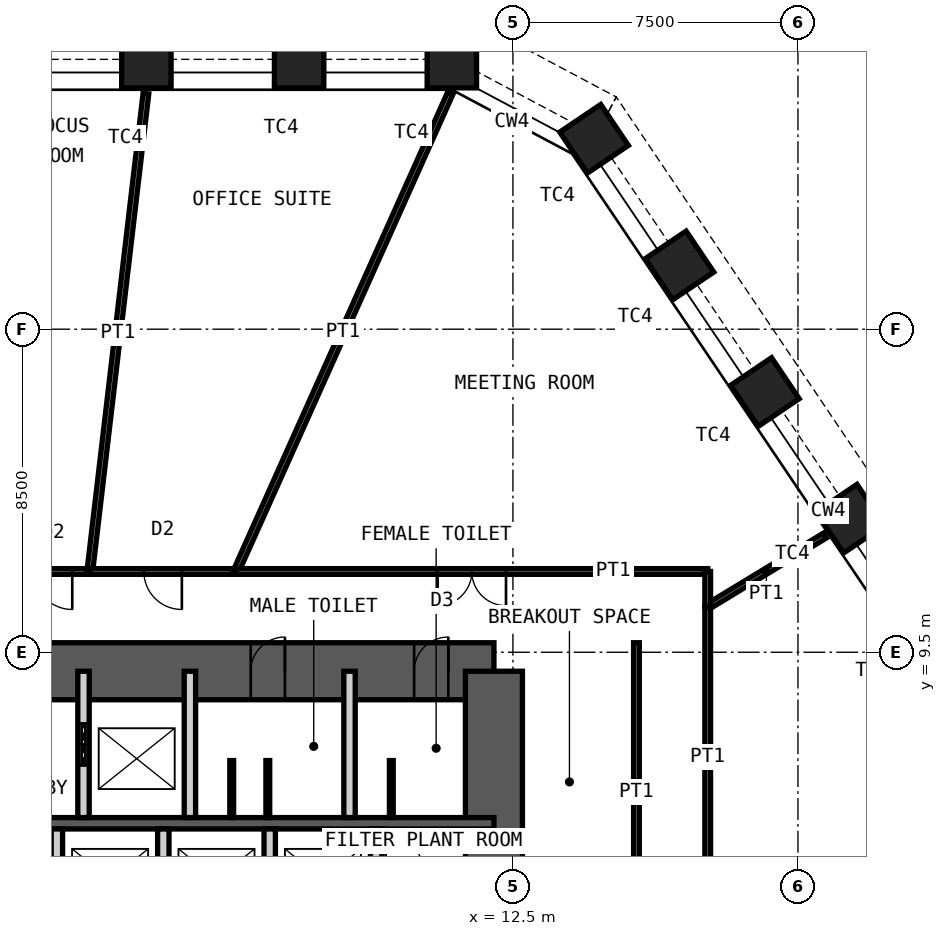
"""IFC4 building model, lengths in metres.
Left out: names, types, materials, properties, quantities, classifications, styles, units other than length and angle.
Written with IfcOpenShell. Run it as: python <this file> out.ifc"""

import sys

from ifc_helpers import new_model, si_unit, direction, frame, frame_2d, origin, origin_2d, place, context, subcontext, project, spatial, rectangle, hollow_rectangle, extrude, element, fill, save


model = new_model("IFC4")
c1 = context("Model", 3, precision=1e-05, world=origin(), true_north=direction((0.0, 1.0)))
c2 = subcontext(c1, "Body", "Model", "MODEL_VIEW")
j1 = project(units=[si_unit("LENGTHUNIT", "METRE"), si_unit("PLANEANGLEUNIT", "RADIAN")], contexts=[c1])
p1 = place(None, origin())
s1 = spatial("IfcSite", under=j1, at=p1, CompositionType="ELEMENT")
p2 = place(p1, origin())
s2 = spatial("IfcBuilding", under=s1, at=p2, CompositionType="ELEMENT")
p3 = place(p2, frame((0.0, 0.0, 140.8)))
s3 = spatial("IfcBuildingStorey", under=s2, at=p3, CompositionType="ELEMENT", Elevation=140.8)
for number, where, z_axis, x_axis in (
    (1, (2.854, 25.0, 0.0), (0.0, 0.0, 1.0), (-1.0, 0.0, 0.0)),
    (2, (6.874, 25.0, 0.0), (0.0, 0.0, 1.0), (-1.0, 0.0, 0.0)),
    (3, (10.893, 25.0, 0.0), (0.0, 0.0, 1.0), (-1.0, 0.0, 0.0)),
    (4, (14.635, 23.01, 0.0), (0.0, 0.0, 1.0), (-0.559, 0.829, 0.0)),
    (5, (16.882, 19.678, 0.0), (0.0, 0.0, 1.0), (-0.559, 0.829, 0.0)),
    (6, (19.13, 16.346, 0.0), (0.0, 0.0, 1.0), (-0.559, 0.829, 0.0)),
    (7, (21.377, 13.014, 0.0), (0.0, 0.0, 1.0), (-0.559, 0.829, 0.0)),
):
    element("IfcColumn", number, at=place(p3, frame(where, z_axis=z_axis, x_axis=x_axis)), inside=s3, PredefinedType="COLUMN", context=c2, shape_type="SweptSolid", body=[
        extrude(hollow_rectangle(XDim=1.3, YDim=1.3, WallThickness=0.1, at=origin_2d()), origin(), (0.0, 0.0, 1.0), 4.2),
    ])
p4 = place(p3, frame((-12.0, 9.0, 0.0), z_axis=(0.0, 0.0, 1.0), x_axis=(1.0, 0.0, 0.0)))
e8 = element("IfcWall", 8, at=p4, inside=s3, PredefinedType="SHEAR", context=c2, shape_type="SweptSolid", body=[
    extrude(rectangle(XDim=24.0, YDim=1.5, at=frame_2d((12.0, 0.0))), origin(), (0.0, 0.0, 1.0), 4.2),
])
p5 = place(p4, frame((10.4, 0.0, 0.0)))
e9 = element("IfcOpeningElement", 9, at=p5, cuts=e8, PredefinedType="OPENING", context=c2, shape_type="SweptSolid", body=[
    extrude(rectangle(XDim=1.0, YDim=2.1, at=frame_2d((0.5, 1.05))), frame((0.0, 0.76, 0.0), z_axis=(0.0, -1.0, 0.0), x_axis=(1.0, 0.0, 0.0)), (0.0, 0.0, 1.0), 1.52),
])
p6 = place(p4, frame((17.6, 0.0, 0.0)))
e10 = element("IfcOpeningElement", 10, at=p6, cuts=e8, PredefinedType="OPENING", context=c2, shape_type="SweptSolid", body=[
    extrude(rectangle(XDim=0.9, YDim=2.1, at=frame_2d((0.45, 1.05))), frame((0.0, 0.76, 0.0), z_axis=(0.0, -1.0, 0.0), x_axis=(1.0, 0.0, 0.0)), (0.0, 0.0, 1.0), 1.52),
])
p7 = place(p4, frame((21.9, 0.0, 0.0)))
e11 = element("IfcOpeningElement", 11, at=p7, cuts=e8, PredefinedType="OPENING", context=c2, shape_type="SweptSolid", body=[
    extrude(rectangle(XDim=0.9, YDim=2.1, at=frame_2d((0.45, 1.05))), frame((0.0, 0.76, 0.0), z_axis=(0.0, -1.0, 0.0), x_axis=(1.0, 0.0, 0.0)), (0.0, 0.0, 1.0), 1.52),
])
p8 = place(p3, frame((12.0, -9.0, 0.0), z_axis=(0.0, 0.0, 1.0), x_axis=(0.0, 1.0, 0.0)))
e12 = element("IfcWall", 12, at=p8, inside=s3, PredefinedType="SHEAR", context=c2, shape_type="SweptSolid", body=[
    extrude(rectangle(XDim=18.0, YDim=1.5, at=frame_2d((9.0, 0.0))), origin(), (0.0, 0.0, 1.0), 4.2),
])
p9 = place(p8, frame((8.1, 0.0, 0.0)))
e13 = element("IfcOpeningElement", 13, at=p9, cuts=e12, PredefinedType="OPENING", context=c2, shape_type="SweptSolid", body=[
    extrude(rectangle(XDim=1.8, YDim=2.1, at=frame_2d((0.9, 1.05))), frame((0.0, 0.76, 0.0), z_axis=(0.0, -1.0, 0.0), x_axis=(1.0, 0.0, 0.0)), (0.0, 0.0, 1.0), 1.52),
])
p10 = place(p3, frame((-12.0, 5.0, 0.0), z_axis=(0.0, 0.0, 1.0), x_axis=(1.0, 0.0, 0.0)))
e14 = element("IfcWall", 14, at=p10, inside=s3, PredefinedType="SHEAR", context=c2, shape_type="SweptSolid", body=[
    extrude(rectangle(XDim=24.0, YDim=0.3, at=frame_2d((12.0, 0.0))), origin(), (0.0, 0.0, 1.0), 4.2),
])
p11 = place(p3, frame((1.2, 5.15, 0.0), z_axis=(0.0, 0.0, 1.0), x_axis=(0.0, 1.0, 0.0)))
e15 = element("IfcWall", 15, at=p11, inside=s3, PredefinedType="PARTITIONING", context=c2, shape_type="SweptSolid", body=[
    extrude(rectangle(XDim=3.85, YDim=0.3, at=frame_2d((1.925, 0.0))), origin(), (0.0, 0.0, 1.0), 3.98),
])
p12 = place(p11, frame((1.375, 0.0, 0.0)))
e16 = element("IfcOpeningElement", 16, at=p12, cuts=e15, PredefinedType="OPENING", context=c2, shape_type="SweptSolid", body=[
    extrude(rectangle(XDim=1.1, YDim=2.4, at=frame_2d((0.55, 1.2))), frame((0.0, 0.16, 0.0), z_axis=(0.0, -1.0, 0.0), x_axis=(1.0, 0.0, 0.0)), (0.0, 0.0, 1.0), 0.32),
])
for number, where, z_axis, x_axis in (
    (17, (4.0, 5.15, 0.0), (0.0, 0.0, 1.0), (0.0, 1.0, 0.0)),
    (18, (8.2, 5.15, 0.0), (0.0, 0.0, 1.0), (0.0, 1.0, 0.0)),
):
    element("IfcWall", number, at=place(p3, frame(where, z_axis=z_axis, x_axis=x_axis)), inside=s3, PredefinedType="PARTITIONING", context=c2, shape_type="SweptSolid", body=[
        extrude(rectangle(XDim=3.85, YDim=0.3, at=frame_2d((1.925, 0.0))), origin(), (0.0, 0.0, 1.0), 3.98),
    ])
for number, where, z_axis, x_axis in (
    (19, (0.5, 2.2, 0.0), (0.0, 0.0, 1.0), (0.0, 1.0, 0.0)),
    (20, (3.3, 2.2, 0.0), (0.0, 0.0, 1.0), (0.0, 1.0, 0.0)),
    (21, (6.1, 2.2, 0.0), (0.0, 0.0, 1.0), (0.0, 1.0, 0.0)),
    (22, (8.9, 2.2, 0.0), (0.0, 0.0, 1.0), (0.0, 1.0, 0.0)),
):
    element("IfcWall", number, at=place(p3, frame(where, z_axis=z_axis, x_axis=x_axis)), inside=s3, PredefinedType="PARTITIONING", context=c2, shape_type="SweptSolid", body=[
        extrude(rectangle(XDim=2.65, YDim=0.3, at=frame_2d((1.325, 0.0))), origin(), (0.0, 0.0, 1.0), 3.98),
    ])
for number, where, z_axis, x_axis in (
    (23, (5.1, 5.15, 0.0), (0.0, 0.0, 1.0), (0.0, 1.0, 0.0)),
    (24, (6.05, 5.15, 0.0), (0.0, 0.0, 1.0), (0.0, 1.0, 0.0)),
    (25, (9.3, 5.15, 0.0), (0.0, 0.0, 1.0), (0.0, 1.0, 0.0)),
):
    element("IfcWall", number, at=place(p3, frame(where, z_axis=z_axis, x_axis=x_axis)), inside=s3, PredefinedType="PARTITIONING", context=c2, shape_type="SweptSolid", body=[
        extrude(rectangle(XDim=1.5, YDim=0.1, at=frame_2d((0.75, 0.0))), origin(), (0.0, 0.0, 1.0), 2.1),
    ])
p13 = place(p3, frame((20.711, 12.571, 0.0), z_axis=(0.0, 0.0, 1.0), x_axis=(-0.854862500505, -0.518854608952, 0.0)))
e26 = element("IfcWall", 26, at=p13, inside=s3, PredefinedType="PARTITIONING", context=c2, shape_type="SweptSolid", body=[
    extrude(rectangle(XDim=3.61, YDim=0.15, at=frame_2d((1.805, 0.0))), origin(), (0.0, 0.0, 1.0), 3.33),
])
p14 = place(p3, frame((17.625, 10.698, 0.0), z_axis=(0.0, 0.0, 1.0), x_axis=(0.0, -1.0, 0.0)))
e27 = element("IfcWall", 27, at=p14, inside=s3, PredefinedType="PARTITIONING", context=c2, shape_type="SweptSolid", body=[
    extrude(rectangle(XDim=19.778, YDim=0.15, at=frame_2d((9.889, 0.0))), origin(), (0.0, 0.0, 1.0), 4.03),
])
p15 = place(p14, frame((8.989, 0.0, 0.0)))
e28 = element("IfcOpeningElement", 28, at=p15, cuts=e27, PredefinedType="OPENING", context=c2, shape_type="SweptSolid", body=[
    extrude(rectangle(XDim=1.8, YDim=2.4, at=frame_2d((0.9, 1.2))), frame((0.0, 0.085, 0.0), z_axis=(0.0, -1.0, 0.0), x_axis=(1.0, 0.0, 0.0)), (0.0, 0.0, 1.0), 0.17),
])
p16 = place(p3, frame((-0.557, 11.625, 0.0), z_axis=(0.0, 0.0, 1.0), x_axis=(1.0, 0.0, 0.0)))
e29 = element("IfcWall", 29, at=p16, inside=s3, PredefinedType="PARTITIONING", context=c2, shape_type="SweptSolid", body=[
    extrude(rectangle(XDim=1.923, YDim=0.15, at=frame_2d((0.961, 0.0))), origin(), (0.0, 0.0, 1.0), 4.03),
])
p17 = place(p16, frame((0.461, 0.0, 0.0)))
e30 = element("IfcOpeningElement", 30, at=p17, cuts=e29, PredefinedType="OPENING", context=c2, shape_type="SweptSolid", body=[
    extrude(rectangle(XDim=1.0, YDim=2.4, at=frame_2d((0.5, 1.2))), frame((0.0, 0.085, 0.0), z_axis=(0.0, -1.0, 0.0), x_axis=(1.0, 0.0, 0.0)), (0.0, 0.0, 1.0), 0.17),
])
p18 = place(p3, frame((2.843, 24.201, 0.0), z_axis=(0.0, 0.0, 1.0), x_axis=(-0.116670084723, -0.993170726175, 0.0)))
e31 = element("IfcWall", 31, at=p18, inside=s3, PredefinedType="PARTITIONING", context=c2, shape_type="SweptSolid", body=[
    extrude(rectangle(XDim=12.662, YDim=0.15, at=frame_2d((6.331, 0.0))), origin(), (0.0, 0.0, 1.0), 3.33),
])
p19 = place(p3, frame((1.366, 11.625, 0.0), z_axis=(0.0, 0.0, 1.0), x_axis=(1.0, 0.0, 0.0)))
e32 = element("IfcWall", 32, at=p19, inside=s3, PredefinedType="PARTITIONING", context=c2, shape_type="SweptSolid", body=[
    extrude(rectangle(XDim=3.845, YDim=0.15, at=frame_2d((1.923, 0.0))), origin(), (0.0, 0.0, 1.0), 4.03),
])
p20 = place(p19, frame((1.423, 0.0, 0.0)))
e33 = element("IfcOpeningElement", 33, at=p20, cuts=e32, PredefinedType="OPENING", context=c2, shape_type="SweptSolid", body=[
    extrude(rectangle(XDim=1.0, YDim=2.4, at=frame_2d((0.5, 1.2))), frame((0.0, 0.085, 0.0), z_axis=(0.0, -1.0, 0.0), x_axis=(1.0, 0.0, 0.0)), (0.0, 0.0, 1.0), 0.17),
])
p21 = place(p3, frame((10.852, 24.209, 0.0), z_axis=(0.0, 0.0, 1.0), x_axis=(-0.40904878746, -0.912512514696, 0.0)))
e34 = element("IfcWall", 34, at=p21, inside=s3, PredefinedType="PARTITIONING", context=c2, shape_type="SweptSolid", body=[
    extrude(rectangle(XDim=13.79, YDim=0.15, at=frame_2d((6.895, 0.0))), origin(), (0.0, 0.0, 1.0), 2.93),
])
p22 = place(p3, frame((5.211, 11.625, 0.0), z_axis=(0.0, 0.0, 1.0), x_axis=(1.0, 0.0, 0.0)))
e35 = element("IfcWall", 35, at=p22, inside=s3, PredefinedType="PARTITIONING", context=c2, shape_type="SweptSolid", body=[
    extrude(rectangle(XDim=12.414, YDim=0.15, at=frame_2d((6.207, 0.0))), origin(), (0.0, 0.0, 1.0), 4.03),
])
p23 = place(p22, frame((5.307, 0.0, 0.0)))
e36 = element("IfcOpeningElement", 36, at=p23, cuts=e35, PredefinedType="OPENING", context=c2, shape_type="SweptSolid", body=[
    extrude(rectangle(XDim=1.8, YDim=2.4, at=frame_2d((0.9, 1.2))), frame((0.0, 0.085, 0.0), z_axis=(0.0, -1.0, 0.0), x_axis=(1.0, 0.0, 0.0)), (0.0, 0.0, 1.0), 0.17),
])
p24 = place(p3, frame((17.625, 11.625, 0.0), z_axis=(0.0, 0.0, 1.0), x_axis=(0.0, -1.0, 0.0)))
e37 = element("IfcWall", 37, at=p24, inside=s3, PredefinedType="PARTITIONING", context=c2, shape_type="SweptSolid", body=[
    extrude(rectangle(XDim=0.927, YDim=0.15, at=frame_2d((0.464, 0.0))), origin(), (0.0, 0.0, 1.0), 4.03),
])
p25 = place(p3, frame((15.75, 1.9, 0.0), z_axis=(0.0, 0.0, 1.0), x_axis=(0.0, 1.0, 0.0)))
e38 = element("IfcWall", 38, at=p25, inside=s3, PredefinedType="PARTITIONING", context=c2, shape_type="SweptSolid", body=[
    extrude(rectangle(XDim=7.85, YDim=0.15, at=frame_2d((3.925, 0.0))), origin(), (0.0, 0.0, 1.0), 4.03),
])
p26 = place(p6, origin())
e39 = element("IfcDoor", 39, at=p26, inside=s3, OperationType="SINGLE_SWING_LEFT", PredefinedType="DOOR", context=c2, shape_type="SweptSolid", body=[
    extrude(rectangle(XDim=0.9, YDim=2.1, at=frame_2d((0.45, 1.05))), frame((0.0, 0.025, 0.0), z_axis=(0.0, -1.0, 0.0), x_axis=(1.0, 0.0, 0.0)), (0.0, 0.0, 1.0), 0.05),
])
fill(e10, e39)
p27 = place(p7, origin())
e40 = element("IfcDoor", 40, at=p27, inside=s3, OperationType="SINGLE_SWING_LEFT", PredefinedType="DOOR", context=c2, shape_type="SweptSolid", body=[
    extrude(rectangle(XDim=0.9, YDim=2.1, at=frame_2d((0.45, 1.05))), frame((0.0, 0.025, 0.0), z_axis=(0.0, -1.0, 0.0), x_axis=(1.0, 0.0, 0.0)), (0.0, 0.0, 1.0), 0.05),
])
fill(e11, e40)
p28 = place(p12, origin())
e41 = element("IfcDoor", 41, at=p28, inside=s3, OperationType="DOUBLE_DOOR_SLIDING", PredefinedType="DOOR", context=c2, shape_type="SweptSolid", body=[
    extrude(rectangle(XDim=1.1, YDim=2.4, at=frame_2d((0.55, 1.2))), frame((0.0, 0.025, 0.0), z_axis=(0.0, -1.0, 0.0), x_axis=(1.0, 0.0, 0.0)), (0.0, 0.0, 1.0), 0.05),
])
fill(e16, e41)
p29 = place(p17, origin())
e42 = element("IfcDoor", 42, at=p29, inside=s3, OperationType="SINGLE_SWING_RIGHT", PredefinedType="DOOR", context=c2, shape_type="SweptSolid", body=[
    extrude(rectangle(XDim=1.0, YDim=2.4, at=frame_2d((0.5, 1.2))), frame((0.0, 0.025, 0.0), z_axis=(0.0, -1.0, 0.0), x_axis=(1.0, 0.0, 0.0)), (0.0, 0.0, 1.0), 0.05),
])
fill(e30, e42)
p30 = place(p20, origin())
e43 = element("IfcDoor", 43, at=p30, inside=s3, OperationType="SINGLE_SWING_RIGHT", PredefinedType="DOOR", context=c2, shape_type="SweptSolid", body=[
    extrude(rectangle(XDim=1.0, YDim=2.4, at=frame_2d((0.5, 1.2))), frame((0.0, 0.025, 0.0), z_axis=(0.0, -1.0, 0.0), x_axis=(1.0, 0.0, 0.0)), (0.0, 0.0, 1.0), 0.05),
])
fill(e33, e43)
p31 = place(p23, origin())
e44 = element("IfcDoor", 44, at=p31, inside=s3, OperationType="DOUBLE_DOOR_DOUBLE_SWING", PredefinedType="DOOR", context=c2, shape_type="SweptSolid", body=[
    extrude(rectangle(XDim=1.8, YDim=2.4, at=frame_2d((0.9, 1.2))), frame((0.0, 0.025, 0.0), z_axis=(0.0, -1.0, 0.0), x_axis=(1.0, 0.0, 0.0)), (0.0, 0.0, 1.0), 0.05),
])
fill(e36, e44)
save(model, sys.argv[1])
